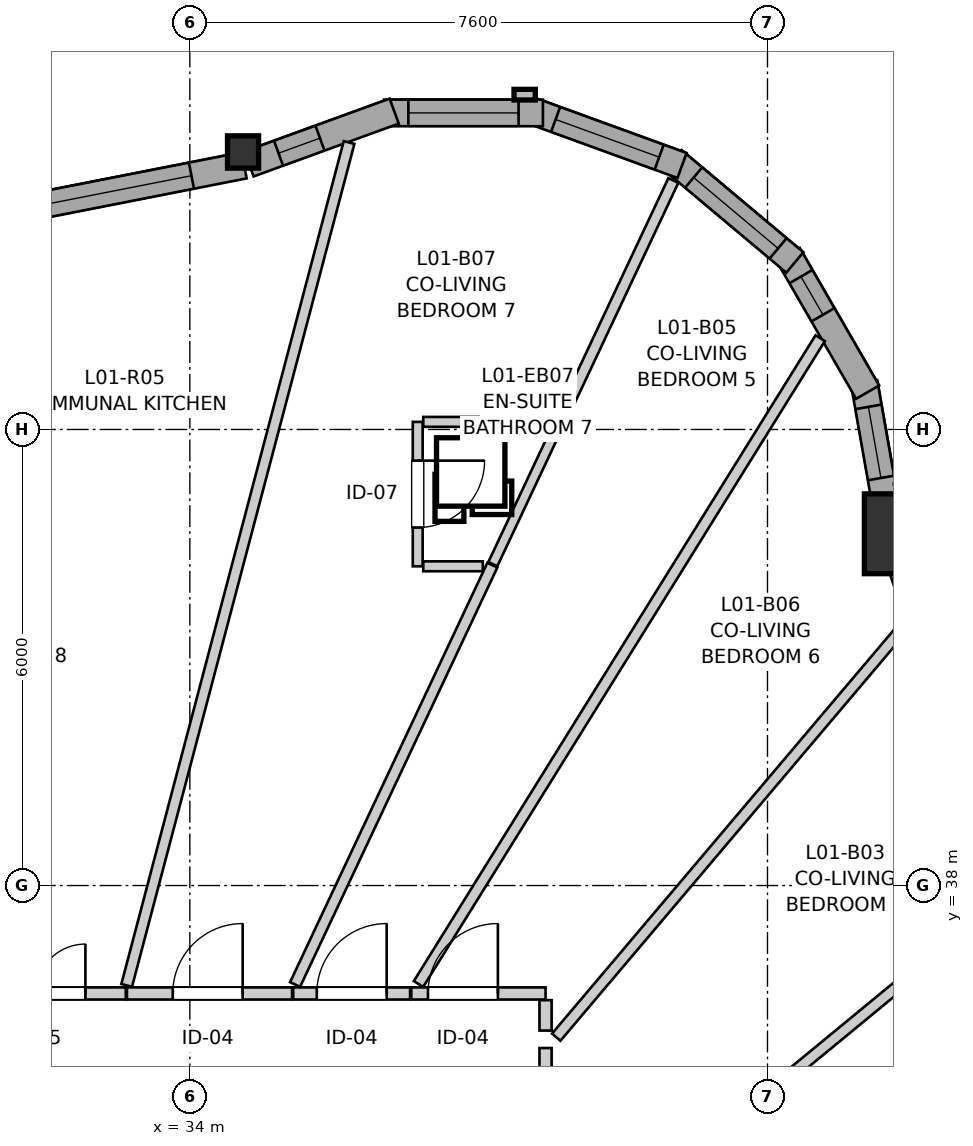
"""IFC4 building model, lengths in metres.
Left out: names, types, materials, properties, quantities, classifications, styles, units other than length and angle.
Written with IfcOpenShell. Run it as: python <this file> out.ifc"""

import sys

from ifc_helpers import new_model, si_unit, direction, frame, frame_2d, origin, origin_2d, place, context, subcontext, project, spatial, rectangle, i_section, extrude, source, transform, mapped, element, fill, save


model = new_model("IFC4")
c1 = context("Model", 3, precision=1e-05, world=origin(), true_north=direction((0.0, 1.0)))
c2 = subcontext(c1, "Body", "Model", "MODEL_VIEW")
j1 = project(units=[si_unit("LENGTHUNIT", "METRE"), si_unit("PLANEANGLEUNIT", "RADIAN")], contexts=[c1])
p1 = place(None, origin())
s1 = spatial("IfcSite", under=j1, at=p1, CompositionType="ELEMENT")
p2 = place(p1, origin())
s2 = spatial("IfcBuilding", under=s1, at=p2, CompositionType="ELEMENT")
p3 = place(p2, frame((0.0, 0.0, 7.8)))
s3 = spatial("IfcBuildingStorey", under=s2, at=p3, CompositionType="ELEMENT", Elevation=7.8)
m1 = source(origin(), c2, "Body", "SweptSolid", [
    extrude(rectangle(XDim=1.05, YDim=1.05, at=origin_2d()), origin(), (0.0, 0.0, 1.0), 2.94),
])
p4 = place(p3, frame((43.4, 42.628, 0.0), z_axis=(0.0, 0.0, 1.0), x_axis=(1.0, 0.0, 0.0)))
e1 = element("IfcColumn", 1, at=p4, inside=s3, PredefinedType="COLUMN", context=c2, shape_type="MappedRepresentation", body=[
    mapped(m1, transform((0.0, 0.0, 0.0), x_axis=(1.0, 0.0, 0.0), y_axis=(0.0, 1.0, 0.0), z_axis=(0.0, 0.0, 1.0), scale=1.0)),
])
m2 = source(origin(), c2, "Body", "SweptSolid", [
    extrude(i_section(OverallWidth=0.409, OverallDepth=0.425, WebThickness=0.03, FlangeThickness=0.048, FilletRadius=0.015, at=origin_2d()), origin(), (0.0, 0.0, 1.0), 2.94),
])
p5 = place(p3, frame((34.7, 47.651, 0.0), z_axis=(0.0, 0.0, 1.0), x_axis=(1.0, 0.0, 0.0)))
e2 = element("IfcColumn", 2, at=p5, inside=s3, PredefinedType="PILASTER", context=c2, shape_type="MappedRepresentation", body=[
    mapped(m2, transform((0.0, 0.0, 0.0), x_axis=(1.0, 0.0, 0.0), y_axis=(0.0, 1.0, 0.0), z_axis=(0.0, 0.0, 1.0), scale=1.0)),
])
p6 = place(p3, frame((44.384, 39.21, 0.0), z_axis=(0.0, 0.0, 1.0), x_axis=(-0.323604561993, 0.946192415663, 0.0)))
e3 = element("IfcWall", 3, at=p6, inside=s3, PredefinedType="SOLIDWALL", context=c2, shape_type="SweptSolid", body=[
    extrude(rectangle(XDim=3.252, YDim=0.35, at=frame_2d((1.626, 0.0))), origin(), (0.0, 0.0, 1.0), 2.42),
])
p7 = place(p6, frame((0.683, 0.0, 0.82)))
e4 = element("IfcOpeningElement", 4, at=p7, cuts=e3, PredefinedType="OPENING", context=c2, shape_type="SweptSolid", body=[
    extrude(rectangle(XDim=1.15, YDim=1.2, at=frame_2d((0.575, 0.6))), frame((0.0, 0.185, 0.0), z_axis=(0.0, -1.0, 0.0), x_axis=(1.0, 0.0, 0.0)), (0.0, 0.0, 1.0), 0.37),
])
p8 = place(p3, frame((43.176, 42.893, 0.0), z_axis=(0.0, 0.0, 1.0), x_axis=(-0.173610462023, 0.984814402553, 0.0)))
e5 = element("IfcWall", 5, at=p8, inside=s3, PredefinedType="SOLIDWALL", context=c2, shape_type="SweptSolid", body=[
    extrude(rectangle(XDim=1.752, YDim=0.35, at=frame_2d((0.876, 0.0))), origin(), (0.0, 0.0, 1.0), 2.42),
])
p9 = place(p8, frame((0.476, 0.0, 0.82)))
e6 = element("IfcOpeningElement", 6, at=p9, cuts=e5, PredefinedType="OPENING", context=c2, shape_type="SweptSolid", body=[
    extrude(rectangle(XDim=0.95, YDim=1.35, at=frame_2d((0.475, 0.675))), frame((0.0, 0.185, 0.0), z_axis=(0.0, -1.0, 0.0), x_axis=(1.0, 0.0, 0.0)), (0.0, 0.0, 1.0), 0.37),
])
p10 = place(p3, frame((42.917, 44.491, 0.0), z_axis=(0.0, 0.0, 1.0), x_axis=(-0.49990781971, 0.866078617559, 0.0)))
e7 = element("IfcWall", 7, at=p10, inside=s3, PredefinedType="SOLIDWALL", context=c2, shape_type="SweptSolid", body=[
    extrude(rectangle(XDim=2.09, YDim=0.35, at=frame_2d((1.045, 0.0))), origin(), (0.0, 0.0, 1.0), 2.42),
])
p11 = place(p10, frame((1.175, 0.0, 0.82)))
e8 = element("IfcOpeningElement", 8, at=p11, cuts=e7, PredefinedType="OPENING", context=c2, shape_type="SweptSolid", body=[
    extrude(rectangle(XDim=0.58, YDim=1.35, at=frame_2d((0.29, 0.675))), frame((0.0, 0.185, 0.0), z_axis=(0.0, -1.0, 0.0), x_axis=(1.0, 0.0, 0.0)), (0.0, 0.0, 1.0), 0.37),
])
p12 = place(p3, frame((41.96, 46.198, 0.0), z_axis=(0.0, 0.0, 1.0), x_axis=(-0.766082082368, 0.642742750308, 0.0)))
e9 = element("IfcWall", 9, at=p12, inside=s3, PredefinedType="SOLIDWALL", context=c2, shape_type="SweptSolid", body=[
    extrude(rectangle(XDim=2.09, YDim=0.35, at=frame_2d((1.045, 0.0))), origin(), (0.0, 0.0, 1.0), 2.42),
])
p13 = place(p12, frame((0.287, 0.0, 0.82)))
e10 = element("IfcOpeningElement", 10, at=p13, cuts=e9, PredefinedType="OPENING", context=c2, shape_type="SweptSolid", body=[
    extrude(rectangle(XDim=1.45, YDim=1.25, at=frame_2d((0.725, 0.625))), frame((0.0, 0.185, 0.0), z_axis=(0.0, -1.0, 0.0), x_axis=(1.0, 0.0, 0.0)), (0.0, 0.0, 1.0), 0.37),
])
p14 = place(p3, frame((40.476, 47.473, 0.0), z_axis=(0.0, 0.0, 1.0), x_axis=(-0.939660353162, 0.342108784886, 0.0)))
e11 = element("IfcWall", 11, at=p14, inside=s3, PredefinedType="SOLIDWALL", context=c2, shape_type="SweptSolid", body=[
    extrude(rectangle(XDim=2.09, YDim=0.35, at=frame_2d((1.045, 0.0))), origin(), (0.0, 0.0, 1.0), 2.42),
])
p15 = place(p14, frame((0.32, 0.0, 0.82)))
e12 = element("IfcOpeningElement", 12, at=p15, cuts=e11, PredefinedType="OPENING", context=c2, shape_type="SweptSolid", body=[
    extrude(rectangle(XDim=1.45, YDim=1.25, at=frame_2d((0.725, 0.625))), frame((0.0, 0.185, 0.0), z_axis=(0.0, -1.0, 0.0), x_axis=(1.0, 0.0, 0.0)), (0.0, 0.0, 1.0), 0.37),
])
p16 = place(p3, frame((38.645, 48.165, 0.0), z_axis=(0.0, 0.0, 1.0), x_axis=(-1.0, 0.0, 0.0)))
e13 = element("IfcWall", 13, at=p16, inside=s3, PredefinedType="SOLIDWALL", context=c2, shape_type="SweptSolid", body=[
    extrude(rectangle(XDim=2.091, YDim=0.35, at=frame_2d((1.045, 0.0))), origin(), (0.0, 0.0, 1.0), 2.42),
])
p17 = place(p16, frame((0.32, 0.0, 0.82)))
e14 = element("IfcOpeningElement", 14, at=p17, cuts=e13, PredefinedType="OPENING", context=c2, shape_type="SweptSolid", body=[
    extrude(rectangle(XDim=1.45, YDim=1.25, at=frame_2d((0.725, 0.625))), frame((0.0, 0.185, 0.0), z_axis=(0.0, -1.0, 0.0), x_axis=(1.0, 0.0, 0.0)), (0.0, 0.0, 1.0), 0.37),
])
p18 = place(p3, frame((36.688, 48.188, 0.0), z_axis=(0.0, 0.0, 1.0), x_axis=(-0.939653047052, -0.342128851701, 0.0)))
e15 = element("IfcWall", 15, at=p18, inside=s3, PredefinedType="SOLIDWALL", context=c2, shape_type="SweptSolid", body=[
    extrude(rectangle(XDim=2.032, YDim=0.35, at=frame_2d((1.016, 0.0))), origin(), (0.0, 0.0, 1.0), 2.42),
])
p19 = place(p18, frame((1.039, 0.0, 0.82)))
e16 = element("IfcOpeningElement", 16, at=p19, cuts=e15, PredefinedType="OPENING", context=c2, shape_type="SweptSolid", body=[
    extrude(rectangle(XDim=0.58, YDim=1.35, at=frame_2d((0.29, 0.675))), frame((0.0, 0.185, 0.0), z_axis=(0.0, -1.0, 0.0), x_axis=(1.0, 0.0, 0.0)), (0.0, 0.0, 1.0), 0.37),
])
p20 = place(p3, frame((34.714, 47.475, 0.0), z_axis=(0.0, 0.0, 1.0), x_axis=(-0.981221268425, -0.192885516282, 0.0)))
e17 = element("IfcWall", 17, at=p20, inside=s3, PredefinedType="SOLIDWALL", context=c2, shape_type="SweptSolid", body=[
    extrude(rectangle(XDim=3.533, YDim=0.35, at=frame_2d((1.766, 0.0))), origin(), (0.0, 0.0, 1.0), 2.42),
])
p21 = place(p20, frame((0.706, 0.0, 0.82)))
e18 = element("IfcOpeningElement", 18, at=p21, cuts=e17, PredefinedType="OPENING", context=c2, shape_type="SweptSolid", body=[
    extrude(rectangle(XDim=2.1, YDim=1.4, at=frame_2d((1.05, 0.7))), frame((0.0, 0.185, 0.0), z_axis=(0.0, -1.0, 0.0), x_axis=(1.0, 0.0, 0.0)), (0.0, 0.0, 1.0), 0.37),
])
p22 = place(p3, frame((38.68, 35.862, 0.0), z_axis=(0.0, 0.0, 1.0), x_axis=(0.0, -1.0, 0.0)))
e19 = element("IfcWall", 19, at=p22, inside=s3, PredefinedType="PARTITIONING", context=c2, shape_type="SweptSolid", body=[
    extrude(rectangle(XDim=3.024, YDim=0.16, at=frame_2d((1.512, 0.0))), origin(), (0.0, 0.0, 1.0), 2.94),
])
p23 = place(p22, frame((1.053, 0.0, 0.0)))
e20 = element("IfcOpeningElement", 20, at=p23, cuts=e19, PredefinedType="OPENING", context=c2, shape_type="SweptSolid", body=[
    extrude(rectangle(XDim=0.92, YDim=2.1, at=frame_2d((0.46, 1.05))), frame((0.0, 0.09, 0.0), z_axis=(0.0, -1.0, 0.0), x_axis=(1.0, 0.0, 0.0)), (0.0, 0.0, 1.0), 0.18),
])
p24 = place(p3, frame((30.841, 36.58, 0.0), z_axis=(0.0, 0.0, 1.0), x_axis=(1.0, 0.0, 0.0)))
e21 = element("IfcWall", 21, at=p24, inside=s3, PredefinedType="PARTITIONING", context=c2, shape_type="SweptSolid", body=[
    extrude(rectangle(XDim=2.316, YDim=0.16, at=frame_2d((1.158, 0.0))), origin(), (0.0, 0.0, 1.0), 2.94),
])
p25 = place(p24, frame((0.485, 0.0, 0.0)))
e22 = element("IfcOpeningElement", 22, at=p25, cuts=e21, PredefinedType="OPENING", context=c2, shape_type="SweptSolid", body=[
    extrude(rectangle(XDim=1.3, YDim=2.1, at=frame_2d((0.65, 1.05))), frame((0.0, 0.09, 0.0), z_axis=(0.0, -1.0, 0.0), x_axis=(1.0, 0.0, 0.0)), (0.0, 0.0, 1.0), 0.18),
])
p26 = place(p3, frame((33.172, 36.58, 0.0), z_axis=(0.0, 0.0, 1.0), x_axis=(1.0, 0.0, 0.0)))
e23 = element("IfcWall", 23, at=p26, inside=s3, PredefinedType="PARTITIONING", context=c2, shape_type="SweptSolid", body=[
    extrude(rectangle(XDim=2.173, YDim=0.16, at=frame_2d((1.086, 0.0))), origin(), (0.0, 0.0, 1.0), 2.94),
])
p27 = place(p26, frame((0.603, 0.0, 0.0)))
e24 = element("IfcOpeningElement", 24, at=p27, cuts=e23, PredefinedType="OPENING", context=c2, shape_type="SweptSolid", body=[
    extrude(rectangle(XDim=0.92, YDim=2.1, at=frame_2d((0.46, 1.05))), frame((0.0, 0.09, 0.0), z_axis=(0.0, -1.0, 0.0), x_axis=(1.0, 0.0, 0.0)), (0.0, 0.0, 1.0), 0.18),
])
p28 = place(p3, frame((36.998, 44.1, 0.0), z_axis=(0.0, 0.0, 1.0), x_axis=(0.0, -1.0, 0.0)))
e25 = element("IfcWall", 25, at=p28, inside=s3, PredefinedType="PARTITIONING", context=c2, shape_type="SweptSolid", body=[
    extrude(rectangle(XDim=1.9, YDim=0.13, at=frame_2d((0.95, 0.0))), origin(), (0.0, 0.0, 1.0), 2.94),
])
p29 = place(p28, frame((0.51, 0.0, 0.0)))
e26 = element("IfcOpeningElement", 26, at=p29, cuts=e25, PredefinedType="OPENING", context=c2, shape_type="SweptSolid", body=[
    extrude(rectangle(XDim=0.88, YDim=2.05, at=frame_2d((0.44, 1.025))), frame((0.0, 0.075, 0.0), z_axis=(0.0, -1.0, 0.0), x_axis=(1.0, 0.0, 0.0)), (0.0, 0.0, 1.0), 0.15),
])
p30 = place(p3, frame((36.913, 36.58, 0.0), z_axis=(0.0, 0.0, 1.0), x_axis=(1.0, 0.0, 0.0)))
e27 = element("IfcWall", 27, at=p30, inside=s3, PredefinedType="PARTITIONING", context=c2, shape_type="SweptSolid", body=[
    extrude(rectangle(XDim=1.767, YDim=0.16, at=frame_2d((0.883, 0.0))), origin(), (0.0, 0.0, 1.0), 2.94),
])
p31 = place(p30, frame((0.22, 0.0, 0.0)))
e28 = element("IfcOpeningElement", 28, at=p31, cuts=e27, PredefinedType="OPENING", context=c2, shape_type="SweptSolid", body=[
    extrude(rectangle(XDim=0.92, YDim=2.1, at=frame_2d((0.46, 1.05))), frame((0.0, 0.09, 0.0), z_axis=(0.0, -1.0, 0.0), x_axis=(1.0, 0.0, 0.0)), (0.0, 0.0, 1.0), 0.18),
])
p32 = place(p3, frame((35.36, 36.58, 0.0), z_axis=(0.0, 0.0, 1.0), x_axis=(1.0, 0.0, 0.0)))
e29 = element("IfcWall", 29, at=p32, inside=s3, PredefinedType="PARTITIONING", context=c2, shape_type="SweptSolid", body=[
    extrude(rectangle(XDim=1.538, YDim=0.16, at=frame_2d((0.769, 0.0))), origin(), (0.0, 0.0, 1.0), 2.94),
])
p33 = place(p32, frame((0.31, 0.0, 0.0)))
e30 = element("IfcOpeningElement", 30, at=p33, cuts=e29, PredefinedType="OPENING", context=c2, shape_type="SweptSolid", body=[
    extrude(rectangle(XDim=0.92, YDim=2.1, at=frame_2d((0.46, 1.05))), frame((0.0, 0.09, 0.0), z_axis=(0.0, -1.0, 0.0), x_axis=(1.0, 0.0, 0.0)), (0.0, 0.0, 1.0), 0.18),
])
p34 = place(p3, frame((33.169, 36.686, 0.0), z_axis=(0.0, 0.0, 1.0), x_axis=(0.255112522394, 0.966911371801, 0.0)))
e31 = element("IfcWall", 31, at=p34, inside=s3, PredefinedType="PARTITIONING", context=c2, shape_type="SweptSolid", body=[
    extrude(rectangle(XDim=11.469, YDim=0.145, at=frame_2d((5.734, 0.0))), origin(), (0.0, 0.0, 1.0), 2.94),
])
p35 = place(p3, frame((37.009, 36.705, 0.0), z_axis=(0.0, 0.0, 1.0), x_axis=(0.528183829193, 0.849130050451, 0.0)))
e32 = element("IfcWall", 32, at=p35, inside=s3, PredefinedType="PARTITIONING", context=c2, shape_type="SweptSolid", body=[
    extrude(rectangle(XDim=10.005, YDim=0.145, at=frame_2d((5.003, 0.0))), origin(), (0.0, 0.0, 1.0), 2.94),
])
p36 = place(p3, frame((38.812, 32.967, 0.0), z_axis=(0.0, 0.0, 1.0), x_axis=(0.772048037558, 0.635564180633, 0.0)))
e33 = element("IfcWall", 33, at=p36, inside=s3, PredefinedType="PARTITIONING", context=c2, shape_type="SweptSolid", body=[
    extrude(rectangle(XDim=7.477, YDim=0.145, at=frame_2d((3.739, 0.0))), origin(), (0.0, 0.0, 1.0), 2.94),
])
p37 = place(p3, frame((38.821, 36.005, 0.0), z_axis=(0.0, 0.0, 1.0), x_axis=(0.646174151972, 0.76318999294, 0.0)))
e34 = element("IfcWall", 34, at=p37, inside=s3, PredefinedType="PARTITIONING", context=c2, shape_type="SweptSolid", body=[
    extrude(rectangle(XDim=7.125, YDim=0.145, at=frame_2d((3.562, 0.0))), origin(), (0.0, 0.0, 1.0), 2.94),
])
p38 = place(p3, frame((35.385, 36.698, 0.0), z_axis=(0.0, 0.0, 1.0), x_axis=(0.425687116038, 0.904870421242, 0.0)))
e35 = element("IfcWall", 35, at=p38, inside=s3, PredefinedType="PARTITIONING", context=c2, shape_type="SweptSolid", body=[
    extrude(rectangle(XDim=6.097, YDim=0.145, at=frame_2d((3.049, 0.0))), origin(), (0.0, 0.0, 1.0), 2.94),
])
p39 = place(p3, frame((38.783, 43.921, 0.0), z_axis=(0.0, 0.0, 1.0), x_axis=(0.425698730146, 0.904864957412, 0.0)))
e36 = element("IfcWall", 36, at=p39, inside=s3, PredefinedType="PARTITIONING", context=c2, shape_type="SweptSolid", body=[
    extrude(rectangle(XDim=3.708, YDim=0.145, at=frame_2d((1.854, 0.0))), origin(), (0.0, 0.0, 1.0), 2.94),
])
p40 = place(p3, frame((37.987, 42.229, 0.0), z_axis=(0.0, 0.0, 1.0), x_axis=(0.425771690569, 0.904830629184, 0.0)))
e37 = element("IfcWall", 37, at=p40, inside=s3, PredefinedType="PARTITIONING", context=c2, shape_type="SweptSolid", body=[
    extrude(rectangle(XDim=1.855, YDim=0.13, at=frame_2d((0.928, 0.0))), origin(), (0.0, 0.0, 1.0), 2.94),
])
p41 = place(p3, frame((37.071, 44.1, 0.0), z_axis=(0.0, 0.0, 1.0), x_axis=(1.0, 0.0, 0.0)))
e38 = element("IfcWall", 38, at=p41, inside=s3, PredefinedType="PARTITIONING", context=c2, shape_type="SweptSolid", body=[
    extrude(rectangle(XDim=1.608, YDim=0.13, at=frame_2d((0.804, 0.0))), origin(), (0.0, 0.0, 1.0), 2.94),
])
p42 = place(p3, frame((37.071, 42.2, 0.0), z_axis=(0.0, 0.0, 1.0), x_axis=(1.0, 0.0, 0.0)))
e39 = element("IfcWall", 39, at=p42, inside=s3, PredefinedType="PARTITIONING", context=c2, shape_type="SweptSolid", body=[
    extrude(rectangle(XDim=0.783, YDim=0.13, at=frame_2d((0.392, 0.0))), origin(), (0.0, 0.0, 1.0), 2.94),
])
p43 = place(p3, frame((38.68, 36.092, 0.0), z_axis=(0.0, 0.0, 1.0), x_axis=(0.0, 1.0, 0.0)))
e40 = element("IfcWall", 40, at=p43, inside=s3, PredefinedType="PARTITIONING", context=c2, shape_type="SweptSolid", body=[
    extrude(rectangle(XDim=0.4, YDim=0.16, at=frame_2d((0.2, 0.0))), origin(), (0.0, 0.0, 1.0), 2.94),
])
m3 = source(origin(), c2, "Body", "SweptSolid", [
    extrude(rectangle(XDim=0.95, YDim=1.35, at=frame_2d((0.475, 0.675))), frame((0.0, 0.03, 0.0), z_axis=(0.0, -1.0, 0.0), x_axis=(1.0, 0.0, 0.0)), (0.0, 0.0, 1.0), 0.06),
])
p44 = place(p9, origin())
e41 = element("IfcWindow", 41, at=p44, inside=s3, PartitioningType="SINGLE_PANEL", PredefinedType="WINDOW", context=c2, shape_type="MappedRepresentation", body=[
    mapped(m3, transform((0.0, 0.0, 0.0), x_axis=(1.0, 0.0, 0.0), y_axis=(0.0, 1.0, 0.0), z_axis=(0.0, 0.0, 1.0), scale=1.0)),
])
fill(e6, e41)
m4 = source(origin(), c2, "Body", "SweptSolid", [
    extrude(rectangle(XDim=0.58, YDim=1.35, at=frame_2d((0.29, 0.675))), frame((0.0, 0.03, 0.0), z_axis=(0.0, -1.0, 0.0), x_axis=(1.0, 0.0, 0.0)), (0.0, 0.0, 1.0), 0.06),
])
p45 = place(p11, origin())
e42 = element("IfcWindow", 42, at=p45, inside=s3, PartitioningType="SINGLE_PANEL", PredefinedType="WINDOW", context=c2, shape_type="MappedRepresentation", body=[
    mapped(m4, transform((0.0, 0.0, 0.0), x_axis=(1.0, 0.0, 0.0), y_axis=(0.0, 1.0, 0.0), z_axis=(0.0, 0.0, 1.0), scale=1.0)),
])
fill(e8, e42)
m5 = source(origin(), c2, "Body", "SweptSolid", [
    extrude(rectangle(XDim=1.45, YDim=1.25, at=frame_2d((0.725, 0.625))), frame((0.0, 0.03, 0.0), z_axis=(0.0, -1.0, 0.0), x_axis=(1.0, 0.0, 0.0)), (0.0, 0.0, 1.0), 0.06),
])
p46 = place(p13, origin())
e43 = element("IfcWindow", 43, at=p46, inside=s3, PartitioningType="SINGLE_PANEL", PredefinedType="WINDOW", context=c2, shape_type="MappedRepresentation", body=[
    mapped(m5, transform((0.0, 0.0, 0.0), x_axis=(1.0, 0.0, 0.0), y_axis=(0.0, 1.0, 0.0), z_axis=(0.0, 0.0, 1.0), scale=1.0)),
])
fill(e10, e43)
p47 = place(p15, origin())
e44 = element("IfcWindow", 44, at=p47, inside=s3, PartitioningType="SINGLE_PANEL", PredefinedType="WINDOW", context=c2, shape_type="MappedRepresentation", body=[
    mapped(m5, transform((0.0, 0.0, 0.0), x_axis=(1.0, 0.0, 0.0), y_axis=(0.0, 1.0, 0.0), z_axis=(0.0, 0.0, 1.0), scale=1.0)),
])
fill(e12, e44)
p48 = place(p17, origin())
e45 = element("IfcWindow", 45, at=p48, inside=s3, PartitioningType="SINGLE_PANEL", PredefinedType="WINDOW", context=c2, shape_type="MappedRepresentation", body=[
    mapped(m5, transform((0.0, 0.0, 0.0), x_axis=(1.0, 0.0, 0.0), y_axis=(0.0, 1.0, 0.0), z_axis=(0.0, 0.0, 1.0), scale=1.0)),
])
fill(e14, e45)
p49 = place(p19, origin())
e46 = element("IfcWindow", 46, at=p49, inside=s3, PartitioningType="SINGLE_PANEL", PredefinedType="WINDOW", context=c2, shape_type="MappedRepresentation", body=[
    mapped(m4, transform((0.0, 0.0, 0.0), x_axis=(1.0, 0.0, 0.0), y_axis=(0.0, 1.0, 0.0), z_axis=(0.0, 0.0, 1.0), scale=1.0)),
])
fill(e16, e46)
m6 = source(origin(), c2, "Body", "SweptSolid", [
    extrude(rectangle(XDim=2.1, YDim=1.4, at=frame_2d((1.05, 0.7))), frame((0.0, 0.03, 0.0), z_axis=(0.0, -1.0, 0.0), x_axis=(1.0, 0.0, 0.0)), (0.0, 0.0, 1.0), 0.06),
])
p50 = place(p21, origin())
e47 = element("IfcWindow", 47, at=p50, inside=s3, PartitioningType="SINGLE_PANEL", PredefinedType="WINDOW", context=c2, shape_type="MappedRepresentation", body=[
    mapped(m6, transform((0.0, 0.0, 0.0), x_axis=(1.0, 0.0, 0.0), y_axis=(0.0, 1.0, 0.0), z_axis=(0.0, 0.0, 1.0), scale=1.0)),
])
fill(e18, e47)
m7 = source(origin(), c2, "Body", "SweptSolid", [
    extrude(rectangle(XDim=1.3, YDim=2.1, at=frame_2d((0.65, 1.05))), frame((0.0, 0.025, 0.0), z_axis=(0.0, -1.0, 0.0), x_axis=(1.0, 0.0, 0.0)), (0.0, 0.0, 1.0), 0.05),
])
p51 = place(p25, origin())
e48 = element("IfcDoor", 48, at=p51, inside=s3, OperationType="DOUBLE_DOOR_SINGLE_SWING", PredefinedType="DOOR", context=c2, shape_type="MappedRepresentation", body=[
    mapped(m7, transform((0.0, 0.0, 0.0), x_axis=(1.0, 0.0, 0.0), y_axis=(0.0, 1.0, 0.0), z_axis=(0.0, 0.0, 1.0), scale=1.0)),
])
fill(e22, e48)
m8 = source(origin(), c2, "Body", "SweptSolid", [
    extrude(rectangle(XDim=0.92, YDim=2.1, at=frame_2d((0.46, 1.05))), frame((0.0, 0.025, 0.0), z_axis=(0.0, -1.0, 0.0), x_axis=(1.0, 0.0, 0.0)), (0.0, 0.0, 1.0), 0.05),
])
p52 = place(p27, origin())
e49 = element("IfcDoor", 49, at=p52, inside=s3, OperationType="SINGLE_SWING_RIGHT", PredefinedType="DOOR", context=c2, shape_type="MappedRepresentation", body=[
    mapped(m8, transform((0.0, 0.0, 0.0), x_axis=(1.0, 0.0, 0.0), y_axis=(0.0, 1.0, 0.0), z_axis=(0.0, 0.0, 1.0), scale=1.0)),
])
fill(e24, e49)
m9 = source(origin(), c2, "Body", "SweptSolid", [
    extrude(rectangle(XDim=0.88, YDim=2.05, at=frame_2d((0.44, 1.025))), frame((0.0, 0.025, 0.0), z_axis=(0.0, -1.0, 0.0), x_axis=(1.0, 0.0, 0.0)), (0.0, 0.0, 1.0), 0.05),
])
p53 = place(p29, origin())
e50 = element("IfcDoor", 50, at=p53, inside=s3, OperationType="SINGLE_SWING_LEFT", PredefinedType="DOOR", context=c2, shape_type="MappedRepresentation", body=[
    mapped(m9, transform((0.0, 0.0, 0.0), x_axis=(1.0, 0.0, 0.0), y_axis=(0.0, 1.0, 0.0), z_axis=(0.0, 0.0, 1.0), scale=1.0)),
])
fill(e26, e50)
p54 = place(p31, origin())
e51 = element("IfcDoor", 51, at=p54, inside=s3, OperationType="SINGLE_SWING_RIGHT", PredefinedType="DOOR", context=c2, shape_type="MappedRepresentation", body=[
    mapped(m8, transform((0.0, 0.0, 0.0), x_axis=(1.0, 0.0, 0.0), y_axis=(0.0, 1.0, 0.0), z_axis=(0.0, 0.0, 1.0), scale=1.0)),
])
fill(e28, e51)
p55 = place(p33, origin())
e52 = element("IfcDoor", 52, at=p55, inside=s3, OperationType="SINGLE_SWING_RIGHT", PredefinedType="DOOR", context=c2, shape_type="MappedRepresentation", body=[
    mapped(m8, transform((0.0, 0.0, 0.0), x_axis=(1.0, 0.0, 0.0), y_axis=(0.0, 1.0, 0.0), z_axis=(0.0, 0.0, 1.0), scale=1.0)),
])
fill(e30, e52)
save(model, sys.argv[1])
